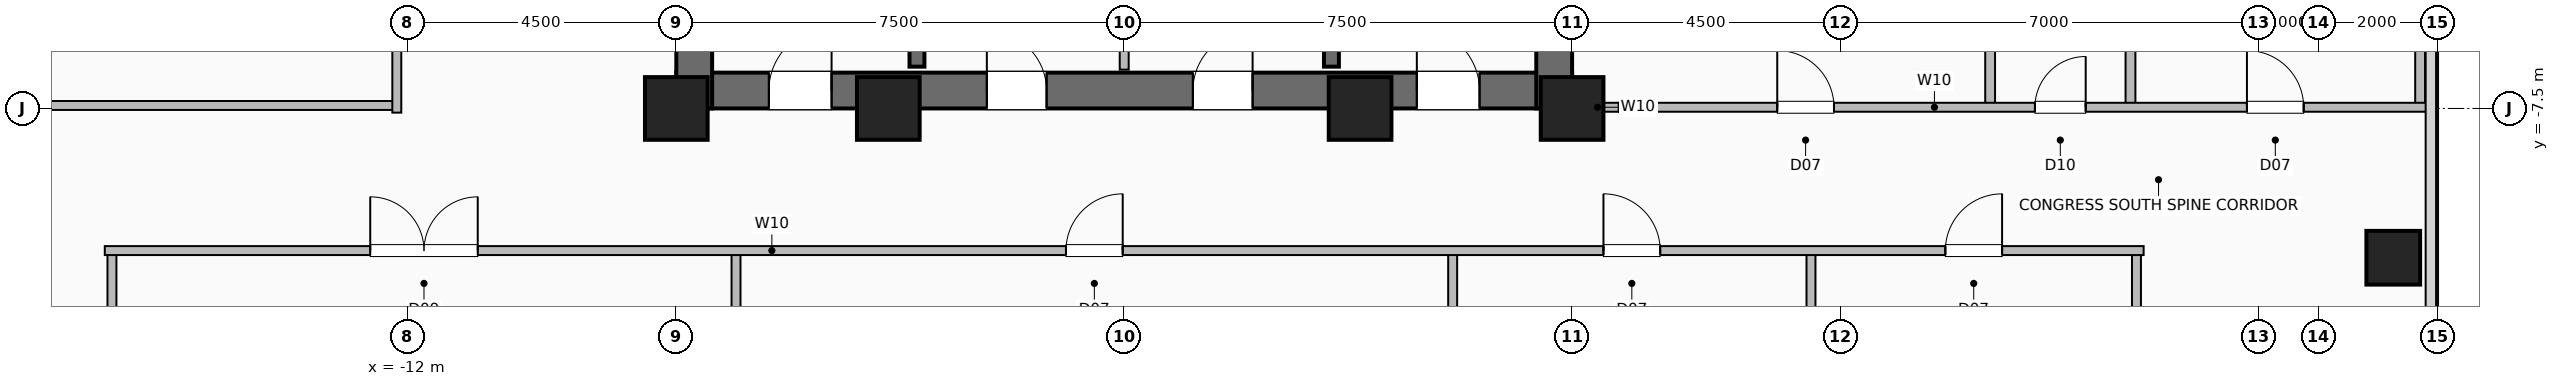
"""IFC4 building model, lengths in metres.
Left out: names, types, materials, properties, quantities, classifications, styles, units other than length and angle.
Written with IfcOpenShell. Run it as: python <this file> out.ifc"""

import sys

from ifc_helpers import new_model, si_unit, direction, frame, frame_2d, origin, origin_2d, place, context, subcontext, project, spatial, rectangle, hollow_rectangle, extrude, element, fill, save


model = new_model("IFC4")
c1 = context("Model", 3, precision=1e-05, world=origin(), true_north=direction((0.0, 1.0)))
c2 = subcontext(c1, "Body", "Model", "MODEL_VIEW")
j1 = project(units=[si_unit("LENGTHUNIT", "METRE"), si_unit("PLANEANGLEUNIT", "RADIAN")], contexts=[c1])
p1 = place(None, origin())
s1 = spatial("IfcSite", under=j1, at=p1, CompositionType="ELEMENT")
p2 = place(p1, origin())
s2 = spatial("IfcBuilding", under=s1, at=p2, CompositionType="ELEMENT")
p3 = place(p2, frame((0.0, 0.0, 119.2)))
s3 = spatial("IfcBuildingStorey", under=s2, at=p3, CompositionType="ELEMENT", Elevation=119.2)
for number, where, z_axis, x_axis in (
    (1, (-7.5, -7.5, 0.0), (0.0, 0.0, 1.0), (1.0, 0.0, 0.0)),
    (2, (-3.95, -7.5, 0.0), (0.0, 0.0, 1.0), (1.0, 0.0, 0.0)),
    (3, (3.95, -7.5, 0.0), (0.0, 0.0, 1.0), (1.0, 0.0, 0.0)),
    (4, (7.5, -7.5, 0.0), (0.0, 0.0, 1.0), (1.0, 0.0, 0.0)),
):
    element("IfcColumn", number, at=place(p3, frame(where, z_axis=z_axis, x_axis=x_axis)), inside=s3, PredefinedType="COLUMN", context=c2, shape_type="SweptSolid", body=[
        extrude(hollow_rectangle(XDim=1.05, YDim=1.05, WallThickness=0.05, at=origin_2d()), origin(), (0.0, 0.0, 1.0), 3.6),
    ])
p4 = place(p3, frame((21.25, -10.0, 0.0), z_axis=(0.0, 0.0, 1.0), x_axis=(1.0, 0.0, 0.0)))
e5 = element("IfcColumn", 5, at=p4, inside=s3, PredefinedType="COLUMN", context=c2, shape_type="SweptSolid", body=[
    extrude(hollow_rectangle(XDim=0.9, YDim=0.9, WallThickness=0.045, at=origin_2d()), origin(), (0.0, 0.0, 1.0), 3.6),
])
p5 = place(p3, frame((-7.5, -7.2, 0.0), z_axis=(0.0, 0.0, 1.0), x_axis=(1.0, 0.0, 0.0)))
e6 = element("IfcWall", 6, at=p5, inside=s3, PredefinedType="SHEAR", context=c2, shape_type="SweptSolid", body=[
    extrude(rectangle(XDim=15.0, YDim=0.6, at=frame_2d((7.5, 0.0))), origin(), (0.0, 0.0, 1.0), 3.36),
])
p6 = place(p5, frame((1.55, 0.0, 0.0)))
e7 = element("IfcOpeningElement", 7, at=p6, cuts=e6, PredefinedType="OPENING", context=c2, shape_type="SweptSolid", body=[
    extrude(rectangle(XDim=1.05, YDim=2.08, at=frame_2d((0.525, 1.04))), frame((0.0, 0.31, 0.0), z_axis=(0.0, -1.0, 0.0), x_axis=(1.0, 0.0, 0.0)), (0.0, 0.0, 1.0), 0.62),
])
p7 = place(p5, frame((12.4, 0.0, 0.0)))
e8 = element("IfcOpeningElement", 8, at=p7, cuts=e6, PredefinedType="OPENING", context=c2, shape_type="SweptSolid", body=[
    extrude(rectangle(XDim=1.05, YDim=2.08, at=frame_2d((0.525, 1.04))), frame((0.0, 0.31, 0.0), z_axis=(0.0, -1.0, 0.0), x_axis=(1.0, 0.0, 0.0)), (0.0, 0.0, 1.0), 0.62),
])
p8 = place(p5, frame((5.2, 0.0, 0.0)))
e9 = element("IfcOpeningElement", 9, at=p8, cuts=e6, PredefinedType="OPENING", context=c2, shape_type="SweptSolid", body=[
    extrude(rectangle(XDim=1.0, YDim=2.08, at=frame_2d((0.5, 1.04))), frame((0.0, 0.31, 0.0), z_axis=(0.0, -1.0, 0.0), x_axis=(1.0, 0.0, 0.0)), (0.0, 0.0, 1.0), 0.62),
])
p9 = place(p5, frame((8.65, 0.0, 0.0)))
e10 = element("IfcOpeningElement", 10, at=p9, cuts=e6, PredefinedType="OPENING", context=c2, shape_type="SweptSolid", body=[
    extrude(rectangle(XDim=1.0, YDim=2.08, at=frame_2d((0.5, 1.04))), frame((0.0, 0.31, 0.0), z_axis=(0.0, -1.0, 0.0), x_axis=(1.0, 0.0, 0.0)), (0.0, 0.0, 1.0), 0.62),
])
p10 = place(p3, frame((-7.2, -7.5, 0.0), z_axis=(0.0, 0.0, 1.0), x_axis=(0.0, 1.0, 0.0)))
e11 = element("IfcWall", 11, at=p10, inside=s3, PredefinedType="SHEAR", context=c2, shape_type="SweptSolid", body=[
    extrude(rectangle(XDim=15.0, YDim=0.6, at=frame_2d((7.5, 0.0))), origin(), (0.0, 0.0, 1.0), 3.36),
])
p11 = place(p10, frame((9.5, 0.0, 0.0)))
e12 = element("IfcOpeningElement", 12, at=p11, cuts=e11, PredefinedType="OPENING", context=c2, shape_type="SweptSolid", body=[
    extrude(rectangle(XDim=1.0, YDim=2.08, at=frame_2d((0.5, 1.04))), frame((0.0, 0.31, 0.0), z_axis=(0.0, -1.0, 0.0), x_axis=(1.0, 0.0, 0.0)), (0.0, 0.0, 1.0), 0.62),
])
p12 = place(p3, frame((7.2, -7.5, 0.0), z_axis=(0.0, 0.0, 1.0), x_axis=(0.0, 1.0, 0.0)))
e13 = element("IfcWall", 13, at=p12, inside=s3, PredefinedType="SHEAR", context=c2, shape_type="SweptSolid", body=[
    extrude(rectangle(XDim=15.0, YDim=0.6, at=frame_2d((7.5, 0.0))), origin(), (0.0, 0.0, 1.0), 3.36),
])
for number, where, z_axis, x_axis in (
    (14, (-3.47, -6.8, 0.0), (0.0, 0.0, 1.0), (0.0, 1.0, 0.0)),
    (15, (3.47, -6.8, 0.0), (0.0, 0.0, 1.0), (0.0, 1.0, 0.0)),
):
    element("IfcWall", number, at=place(p3, frame(where, z_axis=z_axis, x_axis=x_axis)), inside=s3, PredefinedType="SHEAR", context=c2, shape_type="SweptSolid", body=[
        extrude(rectangle(XDim=7.72, YDim=0.25, at=frame_2d((3.86, 0.0))), origin(), (0.0, 0.0, 1.0), 3.36),
    ])
p13 = place(p3, frame((0.0, -6.85, 0.0), z_axis=(0.0, 0.0, 1.0), x_axis=(0.0, 1.0, 0.0)))
e16 = element("IfcWall", 16, at=p13, inside=s3, PredefinedType="PARTITIONING", context=c2, shape_type="SweptSolid", body=[
    extrude(rectangle(XDim=4.42, YDim=0.15, at=frame_2d((2.21, 0.0))), origin(), (0.0, 0.0, 1.0), 3.36),
])
for number, where, z_axis, x_axis in (
    (17, (-16.95, -21.82, 0.0), (0.0, 0.0, 1.0), (0.0, 1.0, 0.0)),
    (18, (-6.5, -21.82, 0.0), (0.0, 0.0, 1.0), (0.0, 1.0, 0.0)),
    (19, (5.5, -21.82, 0.0), (0.0, 0.0, 1.0), (0.0, 1.0, 0.0)),
    (20, (11.5, -21.82, 0.0), (0.0, 0.0, 1.0), (0.0, 1.0, 0.0)),
    (21, (16.95, -21.82, 0.0), (0.0, 0.0, 1.0), (0.0, 1.0, 0.0)),
):
    element("IfcWall", number, at=place(p3, frame(where, z_axis=z_axis, x_axis=x_axis)), inside=s3, PredefinedType="PARTITIONING", context=c2, shape_type="SweptSolid", body=[
        extrude(rectangle(XDim=11.94, YDim=0.15, at=frame_2d((5.97, 0.0))), origin(), (0.0, 0.0, 1.0), 3.36),
    ])
p14 = place(p3, frame((-17.07, -9.88, 0.0), z_axis=(0.0, 0.0, 1.0), x_axis=(1.0, 0.0, 0.0)))
e22 = element("IfcWall", 22, at=p14, inside=s3, PredefinedType="PARTITIONING", context=c2, shape_type="SweptSolid", body=[
    extrude(rectangle(XDim=34.14, YDim=0.15, at=frame_2d((17.07, 0.0))), origin(), (0.0, 0.0, 1.0), 3.36),
])
p15 = place(p14, frame((4.445, 0.0, 0.0)))
e23 = element("IfcOpeningElement", 23, at=p15, cuts=e22, PredefinedType="OPENING", context=c2, shape_type="SweptSolid", body=[
    extrude(rectangle(XDim=1.8, YDim=2.08, at=frame_2d((0.9, 1.04))), frame((0.0, 0.085, 0.0), z_axis=(0.0, -1.0, 0.0), x_axis=(1.0, 0.0, 0.0)), (0.0, 0.0, 1.0), 0.17),
])
p16 = place(p14, frame((16.095, 0.0, 0.0)))
e24 = element("IfcOpeningElement", 24, at=p16, cuts=e22, PredefinedType="OPENING", context=c2, shape_type="SweptSolid", body=[
    extrude(rectangle(XDim=0.95, YDim=2.06, at=frame_2d((0.475, 1.03))), frame((0.0, 0.085, 0.0), z_axis=(0.0, -1.0, 0.0), x_axis=(1.0, 0.0, 0.0)), (0.0, 0.0, 1.0), 0.17),
])
p17 = place(p14, frame((25.095, 0.0, 0.0)))
e25 = element("IfcOpeningElement", 25, at=p17, cuts=e22, PredefinedType="OPENING", context=c2, shape_type="SweptSolid", body=[
    extrude(rectangle(XDim=0.95, YDim=2.06, at=frame_2d((0.475, 1.03))), frame((0.0, 0.085, 0.0), z_axis=(0.0, -1.0, 0.0), x_axis=(1.0, 0.0, 0.0)), (0.0, 0.0, 1.0), 0.17),
])
p18 = place(p14, frame((30.82, 0.0, 0.0)))
e26 = element("IfcOpeningElement", 26, at=p18, cuts=e22, PredefinedType="OPENING", context=c2, shape_type="SweptSolid", body=[
    extrude(rectangle(XDim=0.95, YDim=2.06, at=frame_2d((0.475, 1.03))), frame((0.0, 0.085, 0.0), z_axis=(0.0, -1.0, 0.0), x_axis=(1.0, 0.0, 0.0)), (0.0, 0.0, 1.0), 0.17),
])
p19 = place(p3, frame((-21.82, -7.45, 0.0), z_axis=(0.0, 0.0, 1.0), x_axis=(1.0, 0.0, 0.0)))
e27 = element("IfcWall", 27, at=p19, inside=s3, PredefinedType="PARTITIONING", context=c2, shape_type="SweptSolid", body=[
    extrude(rectangle(XDim=9.64, YDim=0.15, at=frame_2d((4.82, 0.0))), origin(), (0.0, 0.0, 1.0), 3.36),
])
p20 = place(p3, frame((-12.18, -7.57, 0.0), z_axis=(0.0, 0.0, 1.0), x_axis=(0.0, 1.0, 0.0)))
e28 = element("IfcWall", 28, at=p20, inside=s3, PredefinedType="PARTITIONING", context=c2, shape_type="SweptSolid", body=[
    extrude(rectangle(XDim=15.14, YDim=0.15, at=frame_2d((7.57, 0.0))), origin(), (0.0, 0.0, 1.0), 3.36),
])
p21 = place(p20, frame((3.695, 0.0, 0.0)))
e29 = element("IfcOpeningElement", 29, at=p21, cuts=e28, PredefinedType="OPENING", context=c2, shape_type="SweptSolid", body=[
    extrude(rectangle(XDim=1.8, YDim=2.08, at=frame_2d((0.9, 1.04))), frame((0.0, 0.085, 0.0), z_axis=(0.0, -1.0, 0.0), x_axis=(1.0, 0.0, 0.0)), (0.0, 0.0, 1.0), 0.17),
])
p22 = place(p20, frame((11.57, 0.0, 0.0)))
e30 = element("IfcOpeningElement", 30, at=p22, cuts=e28, PredefinedType="OPENING", context=c2, shape_type="SweptSolid", body=[
    extrude(rectangle(XDim=0.95, YDim=2.06, at=frame_2d((0.475, 1.03))), frame((0.0, 0.085, 0.0), z_axis=(0.0, -1.0, 0.0), x_axis=(1.0, 0.0, 0.0)), (0.0, 0.0, 1.0), 0.17),
])
p23 = place(p3, frame((7.45, -7.48, 0.0), z_axis=(0.0, 0.0, 1.0), x_axis=(1.0, 0.0, 0.0)))
e31 = element("IfcWall", 31, at=p23, inside=s3, PredefinedType="PARTITIONING", context=c2, shape_type="SweptSolid", body=[
    extrude(rectangle(XDim=0.95, YDim=0.15, at=frame_2d((0.475, 0.0))), origin(), (0.0, 0.0, 1.0), 3.36),
])
for number, where, z_axis, x_axis in (
    (32, (16.85, -7.48, 0.0), (0.0, 0.0, 1.0), (0.0, 1.0, 0.0)),
    (33, (14.5, -7.48, 0.0), (0.0, 0.0, 1.0), (0.0, 1.0, 0.0)),
    (34, (21.7, -7.48, 0.0), (0.0, 0.0, 1.0), (0.0, 1.0, 0.0)),
):
    element("IfcWall", number, at=place(p3, frame(where, z_axis=z_axis, x_axis=x_axis)), inside=s3, PredefinedType="PLUMBINGWALL", context=c2, shape_type="SweptSolid", body=[
        extrude(rectangle(XDim=14.88, YDim=0.165, at=frame_2d((7.44, 0.0))), origin(), (0.0, 0.0, 1.0), 3.36),
    ])
p24 = place(p3, frame((8.28, -7.48, 0.0), z_axis=(0.0, 0.0, 1.0), x_axis=(1.0, 0.0, 0.0)))
e35 = element("IfcWall", 35, at=p24, inside=s3, PredefinedType="PARTITIONING", context=c2, shape_type="SweptSolid", body=[
    extrude(rectangle(XDim=13.54, YDim=0.15, at=frame_2d((6.77, 0.0))), origin(), (0.0, 0.0, 1.0), 3.36),
])
p25 = place(p24, frame((2.655, 0.0, 0.0)))
e36 = element("IfcOpeningElement", 36, at=p25, cuts=e35, PredefinedType="OPENING", context=c2, shape_type="SweptSolid", body=[
    extrude(rectangle(XDim=0.95, YDim=2.06, at=frame_2d((0.475, 1.03))), frame((0.0, 0.085, 0.0), z_axis=(0.0, -1.0, 0.0), x_axis=(1.0, 0.0, 0.0)), (0.0, 0.0, 1.0), 0.17),
])
p26 = place(p24, frame((6.97, 0.0, 0.0)))
e37 = element("IfcOpeningElement", 37, at=p26, cuts=e35, PredefinedType="OPENING", context=c2, shape_type="SweptSolid", body=[
    extrude(rectangle(XDim=0.85, YDim=2.05, at=frame_2d((0.425, 1.025))), frame((0.0, 0.085, 0.0), z_axis=(0.0, -1.0, 0.0), x_axis=(1.0, 0.0, 0.0)), (0.0, 0.0, 1.0), 0.17),
])
p27 = place(p24, frame((10.52, 0.0, 0.0)))
e38 = element("IfcOpeningElement", 38, at=p27, cuts=e35, PredefinedType="OPENING", context=c2, shape_type="SweptSolid", body=[
    extrude(rectangle(XDim=0.95, YDim=2.06, at=frame_2d((0.475, 1.03))), frame((0.0, 0.085, 0.0), z_axis=(0.0, -1.0, 0.0), x_axis=(1.0, 0.0, 0.0)), (0.0, 0.0, 1.0), 0.17),
])
p28 = place(p6, origin())
e39 = element("IfcDoor", 39, at=p28, inside=s3, OperationType="SINGLE_SWING_RIGHT", PredefinedType="DOOR", context=c2, shape_type="SweptSolid", body=[
    extrude(rectangle(XDim=1.05, YDim=2.08, at=frame_2d((0.525, 1.04))), frame((0.0, 0.025, 0.0), z_axis=(0.0, -1.0, 0.0), x_axis=(1.0, 0.0, 0.0)), (0.0, 0.0, 1.0), 0.05),
])
fill(e7, e39)
p29 = place(p7, origin())
e40 = element("IfcDoor", 40, at=p29, inside=s3, OperationType="SINGLE_SWING_LEFT", PredefinedType="DOOR", context=c2, shape_type="SweptSolid", body=[
    extrude(rectangle(XDim=1.05, YDim=2.08, at=frame_2d((0.525, 1.04))), frame((0.0, 0.025, 0.0), z_axis=(0.0, -1.0, 0.0), x_axis=(1.0, 0.0, 0.0)), (0.0, 0.0, 1.0), 0.05),
])
fill(e8, e40)
p30 = place(p8, origin())
e41 = element("IfcDoor", 41, at=p30, inside=s3, OperationType="SINGLE_SWING_LEFT", PredefinedType="DOOR", context=c2, shape_type="SweptSolid", body=[
    extrude(rectangle(XDim=1.0, YDim=2.08, at=frame_2d((0.5, 1.04))), frame((0.0, 0.025, 0.0), z_axis=(0.0, -1.0, 0.0), x_axis=(1.0, 0.0, 0.0)), (0.0, 0.0, 1.0), 0.05),
])
fill(e9, e41)
p31 = place(p9, origin())
e42 = element("IfcDoor", 42, at=p31, inside=s3, OperationType="SINGLE_SWING_RIGHT", PredefinedType="DOOR", context=c2, shape_type="SweptSolid", body=[
    extrude(rectangle(XDim=1.0, YDim=2.08, at=frame_2d((0.5, 1.04))), frame((0.0, 0.025, 0.0), z_axis=(0.0, -1.0, 0.0), x_axis=(1.0, 0.0, 0.0)), (0.0, 0.0, 1.0), 0.05),
])
fill(e10, e42)
p32 = place(p15, origin())
e43 = element("IfcDoor", 43, at=p32, inside=s3, OperationType="DOUBLE_DOOR_SINGLE_SWING", PredefinedType="DOOR", context=c2, shape_type="SweptSolid", body=[
    extrude(rectangle(XDim=1.8, YDim=2.08, at=frame_2d((0.9, 1.04))), frame((0.0, 0.025, 0.0), z_axis=(0.0, -1.0, 0.0), x_axis=(1.0, 0.0, 0.0)), (0.0, 0.0, 1.0), 0.05),
])
fill(e23, e43)
p33 = place(p16, origin())
e44 = element("IfcDoor", 44, at=p33, inside=s3, OperationType="SINGLE_SWING_RIGHT", PredefinedType="DOOR", context=c2, shape_type="SweptSolid", body=[
    extrude(rectangle(XDim=0.95, YDim=2.06, at=frame_2d((0.475, 1.03))), frame((0.0, 0.025, 0.0), z_axis=(0.0, -1.0, 0.0), x_axis=(1.0, 0.0, 0.0)), (0.0, 0.0, 1.0), 0.05),
])
fill(e24, e44)
p34 = place(p17, origin())
e45 = element("IfcDoor", 45, at=p34, inside=s3, OperationType="SINGLE_SWING_LEFT", PredefinedType="DOOR", context=c2, shape_type="SweptSolid", body=[
    extrude(rectangle(XDim=0.95, YDim=2.06, at=frame_2d((0.475, 1.03))), frame((0.0, 0.025, 0.0), z_axis=(0.0, -1.0, 0.0), x_axis=(1.0, 0.0, 0.0)), (0.0, 0.0, 1.0), 0.05),
])
fill(e25, e45)
p35 = place(p18, origin())
e46 = element("IfcDoor", 46, at=p35, inside=s3, OperationType="SINGLE_SWING_RIGHT", PredefinedType="DOOR", context=c2, shape_type="SweptSolid", body=[
    extrude(rectangle(XDim=0.95, YDim=2.06, at=frame_2d((0.475, 1.03))), frame((0.0, 0.025, 0.0), z_axis=(0.0, -1.0, 0.0), x_axis=(1.0, 0.0, 0.0)), (0.0, 0.0, 1.0), 0.05),
])
fill(e26, e46)
p36 = place(p25, origin())
e47 = element("IfcDoor", 47, at=p36, inside=s3, OperationType="SINGLE_SWING_LEFT", PredefinedType="DOOR", context=c2, shape_type="SweptSolid", body=[
    extrude(rectangle(XDim=0.95, YDim=2.06, at=frame_2d((0.475, 1.03))), frame((0.0, 0.025, 0.0), z_axis=(0.0, -1.0, 0.0), x_axis=(1.0, 0.0, 0.0)), (0.0, 0.0, 1.0), 0.05),
])
fill(e36, e47)
p37 = place(p26, origin())
e48 = element("IfcDoor", 48, at=p37, inside=s3, OperationType="SINGLE_SWING_RIGHT", PredefinedType="DOOR", context=c2, shape_type="SweptSolid", body=[
    extrude(rectangle(XDim=0.85, YDim=2.05, at=frame_2d((0.425, 1.025))), frame((0.0, 0.025, 0.0), z_axis=(0.0, -1.0, 0.0), x_axis=(1.0, 0.0, 0.0)), (0.0, 0.0, 1.0), 0.05),
])
fill(e37, e48)
p38 = place(p27, origin())
e49 = element("IfcDoor", 49, at=p38, inside=s3, OperationType="SINGLE_SWING_LEFT", PredefinedType="DOOR", context=c2, shape_type="SweptSolid", body=[
    extrude(rectangle(XDim=0.95, YDim=2.06, at=frame_2d((0.475, 1.03))), frame((0.0, 0.025, 0.0), z_axis=(0.0, -1.0, 0.0), x_axis=(1.0, 0.0, 0.0)), (0.0, 0.0, 1.0), 0.05),
])
fill(e38, e49)
save(model, sys.argv[1])
